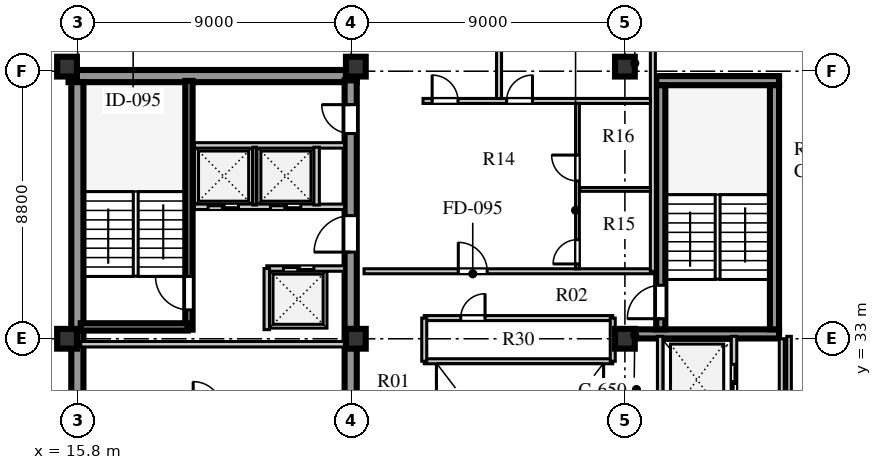
"""IFC4 building model, lengths in metres.
Left out: names, types, materials, properties, quantities, classifications, styles, units other than length and angle.
Written with IfcOpenShell. Run it as: python <this file> out.ifc"""

import sys

from ifc_helpers import new_model, si_unit, direction, frame, frame_2d, origin, origin_2d, place, context, subcontext, project, spatial, rectangle, extrude, element, fill, save


model = new_model("IFC4")
c1 = context("Model", 3, precision=1e-05, world=origin(), true_north=direction((0.0, 1.0)))
c2 = subcontext(c1, "Body", "Model", "MODEL_VIEW")
j1 = project(units=[si_unit("LENGTHUNIT", "METRE"), si_unit("PLANEANGLEUNIT", "RADIAN")], contexts=[c1])
p1 = place(None, origin())
s1 = spatial("IfcSite", under=j1, at=p1, CompositionType="ELEMENT")
p2 = place(p1, origin())
s2 = spatial("IfcBuilding", under=s1, at=p2, CompositionType="ELEMENT")
p3 = place(p2, frame((0.0, 0.0, 327.7)))
s3 = spatial("IfcBuildingStorey", under=s2, at=p3, CompositionType="ELEMENT", Elevation=327.7)
p4 = place(p3, frame((15.5, 41.64, 0.0), z_axis=(0.0, 0.0, 1.0), x_axis=(1.0, 0.0, 0.0)))
e1 = element("IfcWall", 1, at=p4, inside=s3, PredefinedType="SHEAR", context=c2, shape_type="SweptSolid", body=[
    extrude(rectangle(XDim=9.48, YDim=0.4, at=frame_2d((4.74, 0.0))), origin(), (0.0, 0.0, 1.0), 3.56),
])
p5 = place(p3, frame((15.79, 15.81, 0.0), z_axis=(0.0, 0.0, 1.0), x_axis=(0.0, 1.0, 0.0)))
e2 = element("IfcWall", 2, at=p5, inside=s3, PredefinedType="SHEAR", context=c2, shape_type="SweptSolid", body=[
    extrude(rectangle(XDim=25.63, YDim=0.4, at=frame_2d((12.815, 0.0))), origin(), (0.0, 0.0, 1.0), 3.56),
])
p6 = place(p3, frame((24.78, 15.74, 0.0), z_axis=(0.0, 0.0, 1.0), x_axis=(0.0, 1.0, 0.0)))
e3 = element("IfcWall", 3, at=p6, inside=s3, PredefinedType="SHEAR", context=c2, shape_type="SweptSolid", body=[
    extrude(rectangle(XDim=25.76, YDim=0.4, at=frame_2d((12.88, 0.0))), origin(), (0.0, 0.0, 1.0), 3.56),
])
p7 = place(p6, frame((1.61, 0.0, 0.0)))
e4 = element("IfcOpeningElement", 4, at=p7, cuts=e3, PredefinedType="OPENING", context=c2, shape_type="SweptSolid", body=[
    extrude(rectangle(XDim=1.2, YDim=2.1, at=frame_2d((0.6, 1.05))), frame((0.0, 0.21, 0.0), z_axis=(0.0, -1.0, 0.0), x_axis=(1.0, 0.0, 0.0)), (0.0, 0.0, 1.0), 0.42),
])
p8 = place(p6, frame((6.78, 0.0, 0.0)))
e5 = element("IfcOpeningElement", 5, at=p8, cuts=e3, PredefinedType="OPENING", context=c2, shape_type="SweptSolid", body=[
    extrude(rectangle(XDim=0.85, YDim=2.06, at=frame_2d((0.425, 1.03))), frame((0.0, 0.21, 0.0), z_axis=(0.0, -1.0, 0.0), x_axis=(1.0, 0.0, 0.0)), (0.0, 0.0, 1.0), 0.42),
])
p9 = place(p6, frame((12.11, 0.0, 0.0)))
e6 = element("IfcOpeningElement", 6, at=p9, cuts=e3, PredefinedType="OPENING", context=c2, shape_type="SweptSolid", body=[
    extrude(rectangle(XDim=1.5, YDim=2.12, at=frame_2d((0.75, 1.06))), frame((0.0, 0.21, 0.0), z_axis=(0.0, -1.0, 0.0), x_axis=(1.0, 0.0, 0.0)), (0.0, 0.0, 1.0), 0.42),
])
p10 = place(p6, frame((20.11, 0.0, 0.0)))
e7 = element("IfcOpeningElement", 7, at=p10, cuts=e3, PredefinedType="OPENING", context=c2, shape_type="SweptSolid", body=[
    extrude(rectangle(XDim=1.2, YDim=2.12, at=frame_2d((0.6, 1.06))), frame((0.0, 0.21, 0.0), z_axis=(0.0, -1.0, 0.0), x_axis=(1.0, 0.0, 0.0)), (0.0, 0.0, 1.0), 0.42),
])
p11 = place(p6, frame((24.01, 0.0, 0.0)))
e8 = element("IfcOpeningElement", 8, at=p11, cuts=e3, PredefinedType="OPENING", context=c2, shape_type="SweptSolid", body=[
    extrude(rectangle(XDim=0.95, YDim=2.1, at=frame_2d((0.475, 1.05))), frame((0.0, 0.21, 0.0), z_axis=(0.0, -1.0, 0.0), x_axis=(1.0, 0.0, 0.0)), (0.0, 0.0, 1.0), 0.42),
])
p12 = place(p3, frame((34.125, 33.16, 0.0), z_axis=(0.0, 0.0, 1.0), x_axis=(1.0, 0.0, 0.0)))
e9 = element("IfcWall", 9, at=p12, inside=s3, PredefinedType="SHEAR", context=c2, shape_type="SweptSolid", body=[
    extrude(rectangle(XDim=4.745, YDim=0.3, at=frame_2d((2.373, 0.0))), origin(), (0.0, 0.0, 1.0), 3.56),
])
p13 = place(p3, frame((34.83, 41.49, 0.0), z_axis=(0.0, 0.0, 1.0), x_axis=(1.0, 0.0, 0.0)))
e10 = element("IfcWall", 10, at=p13, inside=s3, PredefinedType="SHEAR", context=c2, shape_type="SweptSolid", body=[
    extrude(rectangle(XDim=4.04, YDim=0.3, at=frame_2d((2.02, 0.0))), origin(), (0.0, 0.0, 1.0), 3.56),
])
p14 = place(p3, frame((34.98, 33.31, 0.0), z_axis=(0.0, 0.0, 1.0), x_axis=(0.0, 1.0, 0.0)))
e11 = element("IfcWall", 11, at=p14, inside=s3, PredefinedType="SHEAR", context=c2, shape_type="SweptSolid", body=[
    extrude(rectangle(XDim=8.03, YDim=0.3, at=frame_2d((4.015, 0.0))), origin(), (0.0, 0.0, 1.0), 3.56),
])
p15 = place(p14, frame((0.35, 0.0, 0.0)))
e12 = element("IfcOpeningElement", 12, at=p15, cuts=e11, PredefinedType="OPENING", context=c2, shape_type="SweptSolid", body=[
    extrude(rectangle(XDim=1.1, YDim=2.1, at=frame_2d((0.55, 1.05))), frame((0.0, 0.16, 0.0), z_axis=(0.0, -1.0, 0.0), x_axis=(1.0, 0.0, 0.0)), (0.0, 0.0, 1.0), 0.32),
])
p16 = place(p3, frame((38.72, 33.31, 0.0), z_axis=(0.0, 0.0, 1.0), x_axis=(0.0, 1.0, 0.0)))
e13 = element("IfcWall", 13, at=p16, inside=s3, PredefinedType="SHEAR", context=c2, shape_type="SweptSolid", body=[
    extrude(rectangle(XDim=8.03, YDim=0.3, at=frame_2d((4.015, 0.0))), origin(), (0.0, 0.0, 1.0), 3.56),
])
for number, where, z_axis, x_axis in (
    (14, (15.45, 33.0, 0.0), (0.0, 0.0, 1.0), (1.0, 0.0, 0.0)),
    (15, (15.45, 41.95, 0.0), (0.0, 0.0, 1.0), (1.0, 0.0, 0.0)),
    (16, (24.95, 33.0, 0.0), (0.0, 0.0, 1.0), (1.0, 0.0, 0.0)),
    (17, (24.95, 41.95, 0.0), (0.0, 0.0, 1.0), (1.0, 0.0, 0.0)),
    (18, (33.8, 33.0, 0.0), (0.0, 0.0, 1.0), (1.0, 0.0, 0.0)),
    (19, (33.8, 41.95, 0.0), (0.0, 0.0, 1.0), (1.0, 0.0, 0.0)),
):
    element("IfcColumn", number, at=place(p3, frame(where, z_axis=z_axis, x_axis=x_axis)), inside=s3, PredefinedType="COLUMN", context=c2, shape_type="SweptSolid", body=[
        extrude(rectangle(XDim=0.65, YDim=0.65, at=origin_2d()), origin(), (0.0, 0.0, 1.0), 3.56),
    ])
p17 = place(p3, frame((15.9, 32.82, 0.0), z_axis=(0.0, 0.0, 1.0), x_axis=(1.0, 0.0, 0.0)))
e20 = element("IfcWall", 20, at=p17, inside=s3, PredefinedType="SOLIDWALL", context=c2, shape_type="SweptSolid", body=[
    extrude(rectangle(XDim=8.68, YDim=0.18, at=frame_2d((4.34, 0.0))), origin(), (0.0, 0.0, 1.0), 2.96),
])
p18 = place(p3, frame((19.46, 33.3, 0.0), z_axis=(0.0, 0.0, 1.0), x_axis=(0.0, 1.0, 0.0)))
e21 = element("IfcWall", 21, at=p18, inside=s3, PredefinedType="SHEAR", context=c2, shape_type="SweptSolid", body=[
    extrude(rectangle(XDim=8.18, YDim=0.24, at=frame_2d((4.09, 0.0))), origin(), (0.0, 0.0, 1.0), 3.8),
])
p19 = place(p18, frame((0.65, 0.0, 0.0)))
e22 = element("IfcOpeningElement", 22, at=p19, cuts=e21, PredefinedType="OPENING", context=c2, shape_type="SweptSolid", body=[
    extrude(rectangle(XDim=1.1, YDim=2.1, at=frame_2d((0.55, 1.05))), frame((0.0, 0.13, 0.0), z_axis=(0.0, -1.0, 0.0), x_axis=(1.0, 0.0, 0.0)), (0.0, 0.0, 1.0), 0.26),
])
p20 = place(p3, frame((15.9, 33.39, 0.0), z_axis=(0.0, 0.0, 1.0), x_axis=(1.0, 0.0, 0.0)))
e23 = element("IfcWall", 23, at=p20, inside=s3, PredefinedType="SHEAR", context=c2, shape_type="SweptSolid", body=[
    extrude(rectangle(XDim=3.52, YDim=0.24, at=frame_2d((1.76, 0.0))), origin(), (0.0, 0.0, 1.0), 3.8),
])
p21 = place(p3, frame((22.02, 35.31, 0.0), z_axis=(0.0, 0.0, 1.0), x_axis=(1.0, 0.0, 0.0)))
e24 = element("IfcWall", 24, at=p21, inside=s3, PredefinedType="SOLIDWALL", context=c2, shape_type="SweptSolid", body=[
    extrude(rectangle(XDim=2.56, YDim=0.18, at=frame_2d((1.28, 0.0))), origin(), (0.0, 0.0, 1.0), 3.56),
])
p22 = place(p21, frame((0.55, 0.0, 0.0)))
e25 = element("IfcOpeningElement", 25, at=p22, cuts=e24, PredefinedType="OPENING", context=c2, shape_type="SweptSolid", body=[
    extrude(rectangle(XDim=1.0, YDim=2.1, at=frame_2d((0.5, 1.05))), frame((0.0, 0.1, 0.0), z_axis=(0.0, -1.0, 0.0), x_axis=(1.0, 0.0, 0.0)), (0.0, 0.0, 1.0), 0.2),
])
p23 = place(p3, frame((22.02, 33.3, 0.0), z_axis=(0.0, 0.0, 1.0), x_axis=(0.0, 1.0, 0.0)))
e26 = element("IfcWall", 26, at=p23, inside=s3, PredefinedType="SOLIDWALL", context=c2, shape_type="SweptSolid", body=[
    extrude(rectangle(XDim=2.01, YDim=0.18, at=frame_2d((1.005, 0.0))), origin(), (0.0, 0.0, 1.0), 3.56),
])
p24 = place(p3, frame((19.64, 37.34, 0.0), z_axis=(0.0, 0.0, 1.0), x_axis=(1.0, 0.0, 0.0)))
e27 = element("IfcWall", 27, at=p24, inside=s3, PredefinedType="SOLIDWALL", context=c2, shape_type="SweptSolid", body=[
    extrude(rectangle(XDim=4.94, YDim=0.18, at=frame_2d((2.47, 0.0))), origin(), (0.0, 0.0, 1.0), 3.56),
])
p25 = place(p24, frame((0.45, 0.0, 0.0)))
e28 = element("IfcOpeningElement", 28, at=p25, cuts=e27, PredefinedType="OPENING", context=c2, shape_type="SweptSolid", body=[
    extrude(rectangle(XDim=1.0, YDim=2.1, at=frame_2d((0.5, 1.05))), frame((0.0, 0.1, 0.0), z_axis=(0.0, -1.0, 0.0), x_axis=(1.0, 0.0, 0.0)), (0.0, 0.0, 1.0), 0.2),
])
p26 = place(p24, frame((2.5, 0.0, 0.0)))
e29 = element("IfcOpeningElement", 29, at=p26, cuts=e27, PredefinedType="OPENING", context=c2, shape_type="SweptSolid", body=[
    extrude(rectangle(XDim=1.0, YDim=2.1, at=frame_2d((0.5, 1.05))), frame((0.0, 0.1, 0.0), z_axis=(0.0, -1.0, 0.0), x_axis=(1.0, 0.0, 0.0)), (0.0, 0.0, 1.0), 0.2),
])
p27 = place(p3, frame((19.64, 39.36, 0.0), z_axis=(0.0, 0.0, 1.0), x_axis=(1.0, 0.0, 0.0)))
e30 = element("IfcWall", 30, at=p27, inside=s3, PredefinedType="SOLIDWALL", context=c2, shape_type="SweptSolid", body=[
    extrude(rectangle(XDim=4.94, YDim=0.18, at=frame_2d((2.47, 0.0))), origin(), (0.0, 0.0, 1.0), 3.56),
])
p28 = place(p3, frame((21.62, 37.4, 0.0), z_axis=(0.0, 0.0, 1.0), x_axis=(0.0, 1.0, 0.0)))
e31 = element("IfcWall", 31, at=p28, inside=s3, PredefinedType="PARTITIONING", context=c2, shape_type="SweptSolid", body=[
    extrude(rectangle(XDim=1.9, YDim=0.12, at=frame_2d((0.95, 0.0))), origin(), (0.0, 0.0, 1.0), 3.56),
])
p29 = place(p3, frame((23.66, 37.4, 0.0), z_axis=(0.0, 0.0, 1.0), x_axis=(0.0, 1.0, 0.0)))
e32 = element("IfcWall", 32, at=p29, inside=s3, PredefinedType="SOLIDWALL", context=c2, shape_type="SweptSolid", body=[
    extrude(rectangle(XDim=1.9, YDim=0.18, at=frame_2d((0.95, 0.0))), origin(), (0.0, 0.0, 1.0), 3.56),
])
p30 = place(p3, frame((34.96, 28.86, 0.0), z_axis=(0.0, 0.0, 1.0), x_axis=(0.0, 1.0, 0.0)))
e33 = element("IfcWall", 33, at=p30, inside=s3, PredefinedType="SOLIDWALL", context=c2, shape_type="SweptSolid", body=[
    extrude(rectangle(XDim=4.22, YDim=0.18, at=frame_2d((2.11, 0.0))), origin(), (0.0, 0.0, 1.0), 3.56),
])
p31 = place(p3, frame((37.39, 28.86, 0.0), z_axis=(0.0, 0.0, 1.0), x_axis=(0.0, 1.0, 0.0)))
e34 = element("IfcWall", 34, at=p31, inside=s3, PredefinedType="SOLIDWALL", context=c2, shape_type="SweptSolid", body=[
    extrude(rectangle(XDim=4.22, YDim=0.18, at=frame_2d((2.11, 0.0))), origin(), (0.0, 0.0, 1.0), 3.56),
])
p32 = place(p31, frame((2.1, 0.0, 0.0)))
e35 = element("IfcOpeningElement", 35, at=p32, cuts=e34, PredefinedType="OPENING", context=c2, shape_type="SweptSolid", body=[
    extrude(rectangle(XDim=1.2, YDim=2.12, at=frame_2d((0.6, 1.06))), frame((0.0, 0.1, 0.0), z_axis=(0.0, -1.0, 0.0), x_axis=(1.0, 0.0, 0.0)), (0.0, 0.0, 1.0), 0.2),
])
p33 = place(p3, frame((39.2, 28.86, 0.0), z_axis=(0.0, 0.0, 1.0), x_axis=(0.0, 1.0, 0.0)))
e36 = element("IfcWall", 36, at=p33, inside=s3, PredefinedType="PARTITIONING", context=c2, shape_type="SweptSolid", body=[
    extrude(rectangle(XDim=4.22, YDim=0.15, at=frame_2d((2.11, 0.0))), origin(), (0.0, 0.0, 1.0), 3.56),
])
p34 = place(p3, frame((25.22, 35.22, 0.0), z_axis=(0.0, 0.0, 1.0), x_axis=(1.0, 0.0, 0.0)))
e37 = element("IfcWall", 37, at=p34, inside=s3, PredefinedType="PARTITIONING", context=c2, shape_type="SweptSolid", body=[
    extrude(rectangle(XDim=9.5, YDim=0.165, at=frame_2d((4.75, 0.0))), origin(), (0.0, 0.0, 1.0), 3.56),
])
p35 = place(p34, frame((3.1, 0.0, 0.0)))
e38 = element("IfcOpeningElement", 38, at=p35, cuts=e37, PredefinedType="OPENING", context=c2, shape_type="SweptSolid", body=[
    extrude(rectangle(XDim=0.95, YDim=2.1, at=frame_2d((0.475, 1.05))), frame((0.0, 0.093, 0.0), z_axis=(0.0, -1.0, 0.0), x_axis=(1.0, 0.0, 0.0)), (0.0, 0.0, 1.0), 0.185),
])
p36 = place(p3, frame((34.72, 35.22, 0.0), z_axis=(0.0, 0.0, 1.0), x_axis=(0.0, 1.0, 0.0)))
e39 = element("IfcWall", 39, at=p36, inside=s3, PredefinedType="PARTITIONING", context=c2, shape_type="SweptSolid", body=[
    extrude(rectangle(XDim=10.7, YDim=0.165, at=frame_2d((5.35, 0.0))), origin(), (0.0, 0.0, 1.0), 3.56),
])
p37 = place(p3, frame((27.16, 40.822, 0.0), z_axis=(0.0, 0.0, 1.0), x_axis=(1.0, 0.0, 0.0)))
e40 = element("IfcWall", 40, at=p37, inside=s3, PredefinedType="PARTITIONING", context=c2, shape_type="SweptSolid", body=[
    extrude(rectangle(XDim=7.48, YDim=0.165, at=frame_2d((3.74, 0.0))), origin(), (0.0, 0.0, 1.0), 3.56),
])
p38 = place(p37, frame((0.3, 0.0, 0.0)))
e41 = element("IfcOpeningElement", 41, at=p38, cuts=e40, PredefinedType="OPENING", context=c2, shape_type="SweptSolid", body=[
    extrude(rectangle(XDim=0.85, YDim=2.08, at=frame_2d((0.425, 1.04))), frame((0.0, 0.093, 0.0), z_axis=(0.0, -1.0, 0.0), x_axis=(1.0, 0.0, 0.0)), (0.0, 0.0, 1.0), 0.185),
])
p39 = place(p37, frame((2.75, 0.0, 0.0)))
e42 = element("IfcOpeningElement", 42, at=p39, cuts=e40, PredefinedType="OPENING", context=c2, shape_type="SweptSolid", body=[
    extrude(rectangle(XDim=0.85, YDim=2.08, at=frame_2d((0.425, 1.04))), frame((0.0, 0.093, 0.0), z_axis=(0.0, -1.0, 0.0), x_axis=(1.0, 0.0, 0.0)), (0.0, 0.0, 1.0), 0.185),
])
p40 = place(p3, frame((32.24, 35.3, 0.0), z_axis=(0.0, 0.0, 1.0), x_axis=(0.0, 1.0, 0.0)))
e43 = element("IfcWall", 43, at=p40, inside=s3, PredefinedType="PLUMBINGWALL", context=c2, shape_type="SweptSolid", body=[
    extrude(rectangle(XDim=5.442, YDim=0.125, at=frame_2d((2.721, 0.0))), origin(), (0.0, 0.0, 1.0), 3.56),
])
p41 = place(p40, frame((0.16, 0.0, 0.0)))
e44 = element("IfcOpeningElement", 44, at=p41, cuts=e43, PredefinedType="OPENING", context=c2, shape_type="SweptSolid", body=[
    extrude(rectangle(XDim=0.8, YDim=2.05, at=frame_2d((0.4, 1.025))), frame((0.0, 0.073, 0.0), z_axis=(0.0, -1.0, 0.0), x_axis=(1.0, 0.0, 0.0)), (0.0, 0.0, 1.0), 0.145),
])
p42 = place(p40, frame((2.892, 0.0, 0.0)))
e45 = element("IfcOpeningElement", 45, at=p42, cuts=e43, PredefinedType="OPENING", context=c2, shape_type="SweptSolid", body=[
    extrude(rectangle(XDim=0.85, YDim=2.08, at=frame_2d((0.425, 1.04))), frame((0.0, 0.073, 0.0), z_axis=(0.0, -1.0, 0.0), x_axis=(1.0, 0.0, 0.0)), (0.0, 0.0, 1.0), 0.145),
])
p43 = place(p3, frame((32.32, 37.912, 0.0), z_axis=(0.0, 0.0, 1.0), x_axis=(1.0, 0.0, 0.0)))
e46 = element("IfcWall", 46, at=p43, inside=s3, PredefinedType="PLUMBINGWALL", context=c2, shape_type="SweptSolid", body=[
    extrude(rectangle(XDim=2.32, YDim=0.125, at=frame_2d((1.16, 0.0))), origin(), (0.0, 0.0, 1.0), 3.56),
])
p44 = place(p3, frame((29.66, 40.902, 0.0), z_axis=(0.0, 0.0, 1.0), x_axis=(0.0, 1.0, 0.0)))
e47 = element("IfcWall", 47, at=p44, inside=s3, PredefinedType="PARTITIONING", context=c2, shape_type="SweptSolid", body=[
    extrude(rectangle(XDim=5.018, YDim=0.165, at=frame_2d((2.509, 0.0))), origin(), (0.0, 0.0, 1.0), 3.56),
])
p45 = place(p3, frame((38.96, 28.94, 0.0), z_axis=(0.0, 0.0, 1.0), x_axis=(0.0, 1.0, 0.0)))
e48 = element("IfcWall", 48, at=p45, inside=s3, PredefinedType="PARTITIONING", context=c2, shape_type="SweptSolid", body=[
    extrude(rectangle(XDim=4.06, YDim=0.165, at=frame_2d((2.03, 0.0))), origin(), (0.0, 0.0, 1.0), 3.56),
])
p46 = place(p3, frame((27.2, 33.68, 0.0), z_axis=(0.0, 0.0, 1.0), x_axis=(1.0, 0.0, 0.0)))
e49 = element("IfcWall", 49, at=p46, inside=s3, PredefinedType="PARTITIONING", context=c2, shape_type="SweptSolid", body=[
    extrude(rectangle(XDim=6.2, YDim=0.165, at=frame_2d((3.1, 0.0))), origin(), (0.0, 0.0, 1.0), 3.56),
])
p47 = place(p46, frame((1.2, 0.0, 0.0)))
e50 = element("IfcOpeningElement", 50, at=p47, cuts=e49, PredefinedType="OPENING", context=c2, shape_type="SweptSolid", body=[
    extrude(rectangle(XDim=0.8, YDim=2.05, at=frame_2d((0.4, 1.025))), frame((0.0, 0.093, 0.0), z_axis=(0.0, -1.0, 0.0), x_axis=(1.0, 0.0, 0.0)), (0.0, 0.0, 1.0), 0.185),
])
p48 = place(p3, frame((27.2, 32.26, 0.0), z_axis=(0.0, 0.0, 1.0), x_axis=(1.0, 0.0, 0.0)))
e51 = element("IfcWall", 51, at=p48, inside=s3, PredefinedType="PARTITIONING", context=c2, shape_type="SweptSolid", body=[
    extrude(rectangle(XDim=6.2, YDim=0.165, at=frame_2d((3.1, 0.0))), origin(), (0.0, 0.0, 1.0), 3.01),
])
p49 = place(p3, frame((27.2, 32.26, 0.0), z_axis=(0.0, 0.0, 1.0), x_axis=(0.0, 1.0, 0.0)))
e52 = element("IfcWall", 52, at=p49, inside=s3, PredefinedType="PARTITIONING", context=c2, shape_type="SweptSolid", body=[
    extrude(rectangle(XDim=1.42, YDim=0.165, at=frame_2d((0.71, 0.0))), origin(), (0.0, 0.0, 1.0), 3.56),
])
p50 = place(p3, frame((33.4, 32.26, 0.0), z_axis=(0.0, 0.0, 1.0), x_axis=(0.0, 1.0, 0.0)))
e53 = element("IfcWall", 53, at=p50, inside=s3, PredefinedType="PARTITIONING", context=c2, shape_type="SweptSolid", body=[
    extrude(rectangle(XDim=1.42, YDim=0.165, at=frame_2d((0.71, 0.0))), origin(), (0.0, 0.0, 1.0), 3.01),
])
p51 = place(p19, origin())
e54 = element("IfcDoor", 54, at=p51, inside=s3, OperationType="SINGLE_SWING_RIGHT", PredefinedType="DOOR", context=c2, shape_type="SweptSolid", body=[
    extrude(rectangle(XDim=1.1, YDim=2.1, at=frame_2d((0.55, 1.05))), frame((0.0, 0.025, 0.0), z_axis=(0.0, -1.0, 0.0), x_axis=(1.0, 0.0, 0.0)), (0.0, 0.0, 1.0), 0.05),
])
fill(e22, e54)
p52 = place(p10, frame((1.2, 0.0, 0.0), z_axis=(0.0, 0.0, 1.0), x_axis=(-1.0, 0.0, 0.0)))
e55 = element("IfcDoor", 55, at=p52, inside=s3, OperationType="SINGLE_SWING_RIGHT", PredefinedType="DOOR", context=c2, shape_type="SweptSolid", body=[
    extrude(rectangle(XDim=1.2, YDim=2.12, at=frame_2d((0.6, 1.06))), frame((0.0, 0.025, 0.0), z_axis=(0.0, -1.0, 0.0), x_axis=(1.0, 0.0, 0.0)), (0.0, 0.0, 1.0), 0.05),
])
fill(e7, e55)
p53 = place(p25, frame((1.0, 0.0, 0.0), z_axis=(0.0, 0.0, 1.0), x_axis=(-1.0, 0.0, 0.0)))
e56 = element("IfcDoor", 56, at=p53, inside=s3, OperationType="DOUBLE_DOOR_SLIDING", PredefinedType="DOOR", context=c2, shape_type="SweptSolid", body=[
    extrude(rectangle(XDim=1.0, YDim=2.1, at=frame_2d((0.5, 1.05))), frame((0.0, 0.025, 0.0), z_axis=(0.0, -1.0, 0.0), x_axis=(1.0, 0.0, 0.0)), (0.0, 0.0, 1.0), 0.05),
])
fill(e28, e56)
p54 = place(p26, frame((1.0, 0.0, 0.0), z_axis=(0.0, 0.0, 1.0), x_axis=(-1.0, 0.0, 0.0)))
e57 = element("IfcDoor", 57, at=p54, inside=s3, OperationType="DOUBLE_DOOR_SLIDING", PredefinedType="DOOR", context=c2, shape_type="SweptSolid", body=[
    extrude(rectangle(XDim=1.0, YDim=2.1, at=frame_2d((0.5, 1.05))), frame((0.0, 0.025, 0.0), z_axis=(0.0, -1.0, 0.0), x_axis=(1.0, 0.0, 0.0)), (0.0, 0.0, 1.0), 0.05),
])
fill(e29, e57)
p55 = place(p22, origin())
e58 = element("IfcDoor", 58, at=p55, inside=s3, OperationType="DOUBLE_DOOR_SLIDING", PredefinedType="DOOR", context=c2, shape_type="SweptSolid", body=[
    extrude(rectangle(XDim=1.0, YDim=2.1, at=frame_2d((0.5, 1.05))), frame((0.0, 0.025, 0.0), z_axis=(0.0, -1.0, 0.0), x_axis=(1.0, 0.0, 0.0)), (0.0, 0.0, 1.0), 0.05),
])
fill(e25, e58)
p56 = place(p11, frame((0.95, 0.0, 0.0), z_axis=(0.0, 0.0, 1.0), x_axis=(-1.0, 0.0, 0.0)))
e59 = element("IfcDoor", 59, at=p56, inside=s3, OperationType="SINGLE_SWING_LEFT", PredefinedType="DOOR", context=c2, shape_type="SweptSolid", body=[
    extrude(rectangle(XDim=0.95, YDim=2.1, at=frame_2d((0.475, 1.05))), frame((0.0, 0.025, 0.0), z_axis=(0.0, -1.0, 0.0), x_axis=(1.0, 0.0, 0.0)), (0.0, 0.0, 1.0), 0.05),
])
fill(e8, e59)
p57 = place(p15, origin())
e60 = element("IfcDoor", 60, at=p57, inside=s3, OperationType="SINGLE_SWING_LEFT", PredefinedType="DOOR", context=c2, shape_type="SweptSolid", body=[
    extrude(rectangle(XDim=1.1, YDim=2.1, at=frame_2d((0.55, 1.05))), frame((0.0, 0.025, 0.0), z_axis=(0.0, -1.0, 0.0), x_axis=(1.0, 0.0, 0.0)), (0.0, 0.0, 1.0), 0.05),
])
fill(e12, e60)
p58 = place(p32, frame((1.2, 0.0, 0.0), z_axis=(0.0, 0.0, 1.0), x_axis=(-1.0, 0.0, 0.0)))
e61 = element("IfcDoor", 61, at=p58, inside=s3, OperationType="DOUBLE_DOOR_SLIDING", PredefinedType="DOOR", context=c2, shape_type="SweptSolid", body=[
    extrude(rectangle(XDim=1.2, YDim=2.12, at=frame_2d((0.6, 1.06))), frame((0.0, 0.025, 0.0), z_axis=(0.0, -1.0, 0.0), x_axis=(1.0, 0.0, 0.0)), (0.0, 0.0, 1.0), 0.05),
])
fill(e35, e61)
p59 = place(p41, origin())
e62 = element("IfcDoor", 62, at=p59, inside=s3, OperationType="SINGLE_SWING_LEFT", PredefinedType="DOOR", context=c2, shape_type="SweptSolid", body=[
    extrude(rectangle(XDim=0.8, YDim=2.05, at=frame_2d((0.4, 1.025))), frame((0.0, 0.025, 0.0), z_axis=(0.0, -1.0, 0.0), x_axis=(1.0, 0.0, 0.0)), (0.0, 0.0, 1.0), 0.05),
])
fill(e44, e62)
p60 = place(p42, origin())
e63 = element("IfcDoor", 63, at=p60, inside=s3, OperationType="SINGLE_SWING_RIGHT", PredefinedType="DOOR", context=c2, shape_type="SweptSolid", body=[
    extrude(rectangle(XDim=0.85, YDim=2.08, at=frame_2d((0.425, 1.04))), frame((0.0, 0.025, 0.0), z_axis=(0.0, -1.0, 0.0), x_axis=(1.0, 0.0, 0.0)), (0.0, 0.0, 1.0), 0.05),
])
fill(e45, e63)
p61 = place(p38, origin())
e64 = element("IfcDoor", 64, at=p61, inside=s3, OperationType="SINGLE_SWING_LEFT", PredefinedType="DOOR", context=c2, shape_type="SweptSolid", body=[
    extrude(rectangle(XDim=0.85, YDim=2.08, at=frame_2d((0.425, 1.04))), frame((0.0, 0.025, 0.0), z_axis=(0.0, -1.0, 0.0), x_axis=(1.0, 0.0, 0.0)), (0.0, 0.0, 1.0), 0.05),
])
fill(e41, e64)
p62 = place(p39, origin())
e65 = element("IfcDoor", 65, at=p62, inside=s3, OperationType="SINGLE_SWING_RIGHT", PredefinedType="DOOR", context=c2, shape_type="SweptSolid", body=[
    extrude(rectangle(XDim=0.85, YDim=2.08, at=frame_2d((0.425, 1.04))), frame((0.0, 0.025, 0.0), z_axis=(0.0, -1.0, 0.0), x_axis=(1.0, 0.0, 0.0)), (0.0, 0.0, 1.0), 0.05),
])
fill(e42, e65)
p63 = place(p35, origin())
e66 = element("IfcDoor", 66, at=p63, inside=s3, OperationType="SINGLE_SWING_LEFT", PredefinedType="DOOR", context=c2, shape_type="SweptSolid", body=[
    extrude(rectangle(XDim=0.95, YDim=2.1, at=frame_2d((0.475, 1.05))), frame((0.0, 0.025, 0.0), z_axis=(0.0, -1.0, 0.0), x_axis=(1.0, 0.0, 0.0)), (0.0, 0.0, 1.0), 0.05),
])
fill(e38, e66)
p64 = place(p47, frame((0.8, 0.0, 0.0), z_axis=(0.0, 0.0, 1.0), x_axis=(-1.0, 0.0, 0.0)))
e67 = element("IfcDoor", 67, at=p64, inside=s3, OperationType="SINGLE_SWING_LEFT", PredefinedType="DOOR", context=c2, shape_type="SweptSolid", body=[
    extrude(rectangle(XDim=0.8, YDim=2.05, at=frame_2d((0.4, 1.025))), frame((0.0, 0.025, 0.0), z_axis=(0.0, -1.0, 0.0), x_axis=(1.0, 0.0, 0.0)), (0.0, 0.0, 1.0), 0.05),
])
fill(e50, e67)
save(model, sys.argv[1])
